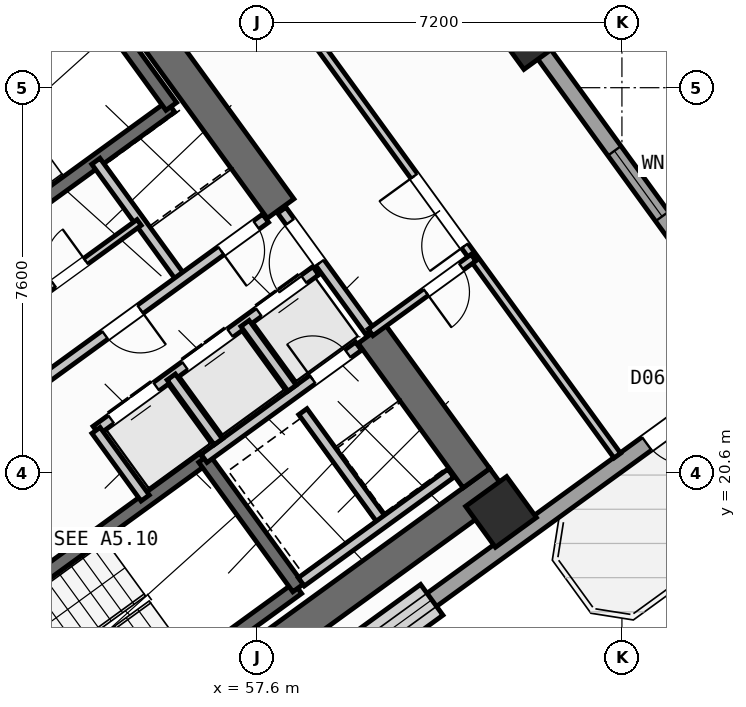
"""IFC4 building model, lengths in metres.
Left out: names, types, materials, properties, quantities, classifications, styles, units other than length and angle.
Written with IfcOpenShell. Run it as: python <this file> out.ifc"""

import sys

from ifc_helpers import new_model, si_unit, direction, frame, frame_2d, origin, origin_2d, place, context, subcontext, project, spatial, rectangle, hollow_rectangle, extrude, source, transform, mapped, element, fill, save


model = new_model("IFC4")
c1 = context("Model", 3, precision=1e-05, world=origin(), true_north=direction((0.0, 1.0)))
c2 = subcontext(c1, "Body", "Model", "MODEL_VIEW")
j1 = project(units=[si_unit("LENGTHUNIT", "METRE"), si_unit("PLANEANGLEUNIT", "RADIAN")], contexts=[c1])
p1 = place(None, origin())
s1 = spatial("IfcSite", under=j1, at=p1, CompositionType="ELEMENT")
p2 = place(p1, origin())
s2 = spatial("IfcBuilding", under=s1, at=p2, CompositionType="ELEMENT")
p3 = place(p2, frame((0.0, 0.0, 76.5)))
s3 = spatial("IfcBuildingStorey", under=s2, at=p3, CompositionType="ELEMENT", Elevation=76.5)
p4 = place(p3, frame((52.318, 13.11, 0.0), z_axis=(0.0, 0.0, 1.0), x_axis=(0.809019445368, 0.587781878776, 0.0)))
e1 = element("IfcWall", 1, at=p4, inside=s3, PredefinedType="SHEAR", context=c2, shape_type="SweptSolid", body=[
    extrude(rectangle(XDim=12.44, YDim=0.65, at=frame_2d((6.22, 0.0))), origin(), (0.0, 0.0, 1.0), 4.25),
])
p5 = place(p3, frame((44.325, 24.113, 0.0), z_axis=(0.0, 0.0, 1.0), x_axis=(0.809012664862, 0.58779121131, 0.0)))
e2 = element("IfcWall", 2, at=p5, inside=s3, PredefinedType="SHEAR", context=c2, shape_type="SweptSolid", body=[
    extrude(rectangle(XDim=12.44, YDim=0.65, at=frame_2d((6.22, 0.0))), origin(), (0.0, 0.0, 1.0), 4.25),
])
p6 = place(p3, frame((61.929, 20.494, 0.0), z_axis=(0.0, 0.0, 1.0), x_axis=(-0.58782982593, 0.808984607855, 0.0)))
e3 = element("IfcWall", 3, at=p6, inside=s3, PredefinedType="SHEAR", context=c2, shape_type="SweptSolid", body=[
    extrude(rectangle(XDim=3.525, YDim=0.65, at=frame_2d((1.762, 0.0))), origin(), (0.0, 0.0, 1.0), 4.25),
])
p7 = place(p3, frame((58.064, 25.813, 0.0), z_axis=(0.0, 0.0, 1.0), x_axis=(-0.58777996584, 0.809020835181, 0.0)))
e4 = element("IfcWall", 4, at=p7, inside=s3, PredefinedType="SHEAR", context=c2, shape_type="SweptSolid", body=[
    extrude(rectangle(XDim=6.375, YDim=0.65, at=frame_2d((3.188, 0.0))), origin(), (0.0, 0.0, 1.0), 4.25),
])
m1 = source(origin(), c2, "Body", "SweptSolid", [
    extrude(hollow_rectangle(XDim=1.0, YDim=1.0, WallThickness=0.04, at=origin_2d()), origin(), (0.0, 0.0, 1.0), 4.5),
])
for number, where, z_axis, x_axis in (
    (5, (62.414, 19.827, 0.0), (0.0, 0.0, 1.0), (0.809, 0.588, 0.0)),
    (6, (62.977, 29.259, 0.0), (0.0, 0.0, 1.0), (0.809, 0.588, 0.0)),
):
    element("IfcColumn", number, at=place(p3, frame(where, z_axis=z_axis, x_axis=x_axis)), inside=s3, PredefinedType="COLUMN", context=c2, shape_type="MappedRepresentation", body=[
        mapped(m1, transform((0.0, 0.0, 0.0), scale=1.0)),
    ])
p8 = place(p3, frame((54.81, 40.5, 0.0), z_axis=(0.0, 0.0, 1.0), x_axis=(0.587783625747, -0.809018176127, 0.0)))
e7 = element("IfcWall", 7, at=p8, inside=s3, PredefinedType="STANDARD", context=c2, shape_type="SweptSolid", body=[
    extrude(rectangle(XDim=21.587, YDim=0.32, at=frame_2d((10.794, 0.0))), origin(), (0.0, 0.0, 1.0), 3.625),
])
p9 = place(p8, frame((2.106, 0.0, 0.7)))
e8 = element("IfcOpeningElement", 8, at=p9, cuts=e7, PredefinedType="OPENING", context=c2, shape_type="SweptSolid", body=[
    extrude(rectangle(XDim=2.6, YDim=2.0, at=frame_2d((1.3, 1.0))), frame((0.0, 0.17, 0.0), z_axis=(0.0, -1.0, 0.0), x_axis=(1.0, 0.0, 0.0)), (0.0, 0.0, 1.0), 0.34),
])
p10 = place(p8, frame((9.244, 0.0, 0.75)))
e9 = element("IfcOpeningElement", 9, at=p10, cuts=e7, PredefinedType="OPENING", context=c2, shape_type="SweptSolid", body=[
    extrude(rectangle(XDim=2.0, YDim=1.95, at=frame_2d((1.0, 0.975))), frame((0.0, 0.17, 0.0), z_axis=(0.0, -1.0, 0.0), x_axis=(1.0, 0.0, 0.0)), (0.0, 0.0, 1.0), 0.34),
])
p11 = place(p8, frame((16.744, 0.0, 0.85)))
e10 = element("IfcOpeningElement", 10, at=p11, cuts=e7, PredefinedType="OPENING", context=c2, shape_type="SweptSolid", body=[
    extrude(rectangle(XDim=1.6, YDim=1.8, at=frame_2d((0.8, 0.9))), frame((0.0, 0.17, 0.0), z_axis=(0.0, -1.0, 0.0), x_axis=(1.0, 0.0, 0.0)), (0.0, 0.0, 1.0), 0.34),
])
p12 = place(p3, frame((67.454, 22.747, 0.0), z_axis=(0.0, 0.0, 1.0), x_axis=(-0.809021120468, -0.587779573171, 0.0)))
e11 = element("IfcWall", 11, at=p12, inside=s3, PredefinedType="STANDARD", context=c2, shape_type="SweptSolid", body=[
    extrude(rectangle(XDim=17.588, YDim=0.32, at=frame_2d((8.794, 0.0))), origin(), (0.0, 0.0, 1.0), 4.25),
])
p13 = place(p12, frame((1.624, 0.0, 0.0)))
e12 = element("IfcOpeningElement", 12, at=p13, cuts=e11, PredefinedType="OPENING", context=c2, shape_type="SweptSolid", body=[
    extrude(rectangle(XDim=1.05, YDim=2.15, at=frame_2d((0.525, 1.075))), frame((0.0, 0.17, 0.0), z_axis=(0.0, -1.0, 0.0), x_axis=(1.0, 0.0, 0.0)), (0.0, 0.0, 1.0), 0.34),
])
p14 = place(p12, frame((7.919, 0.0, 0.7)))
e13 = element("IfcOpeningElement", 13, at=p14, cuts=e11, PredefinedType="OPENING", context=c2, shape_type="SweptSolid", body=[
    extrude(rectangle(XDim=2.6, YDim=2.0, at=frame_2d((1.3, 1.0))), frame((0.0, 0.17, 0.0), z_axis=(0.0, -1.0, 0.0), x_axis=(1.0, 0.0, 0.0)), (0.0, 0.0, 1.0), 0.34),
])
p15 = place(p12, frame((13.069, 0.0, 0.7)))
e14 = element("IfcOpeningElement", 14, at=p15, cuts=e11, PredefinedType="OPENING", context=c2, shape_type="SweptSolid", body=[
    extrude(rectangle(XDim=2.6, YDim=2.0, at=frame_2d((1.3, 1.0))), frame((0.0, 0.17, 0.0), z_axis=(0.0, -1.0, 0.0), x_axis=(1.0, 0.0, 0.0)), (0.0, 0.0, 1.0), 0.34),
])
p16 = place(p3, frame((48.006, 25.996, 0.0), z_axis=(0.0, 0.0, 1.0), x_axis=(0.80901903764, 0.587782439969, 0.0)))
e15 = element("IfcWall", 15, at=p16, inside=s3, PredefinedType="SHEAR", context=c2, shape_type="SweptSolid", body=[
    extrude(rectangle(XDim=7.46, YDim=0.26, at=frame_2d((3.73, 0.0))), origin(), (0.0, 0.0, 1.0), 4.25),
])
p17 = place(p3, frame((49.863, 23.44, 0.0), z_axis=(0.0, 0.0, 1.0), x_axis=(0.809003474932, 0.587803859759, 0.0)))
e16 = element("IfcWall", 16, at=p17, inside=s3, PredefinedType="SHEAR", context=c2, shape_type="SweptSolid", body=[
    extrude(rectangle(XDim=7.46, YDim=0.26, at=frame_2d((3.73, 0.0))), origin(), (0.0, 0.0, 1.0), 4.25),
])
p18 = place(p17, frame((0.36, 0.0, 0.0)))
e17 = element("IfcOpeningElement", 17, at=p18, cuts=e16, PredefinedType="OPENING", context=c2, shape_type="SweptSolid", body=[
    extrude(rectangle(XDim=0.86, YDim=2.05, at=frame_2d((0.43, 1.025))), frame((0.0, 0.14, 0.0), z_axis=(0.0, -1.0, 0.0), x_axis=(1.0, 0.0, 0.0)), (0.0, 0.0, 1.0), 0.28),
])
p19 = place(p3, frame((55.906, 27.831, 0.0), z_axis=(0.0, 0.0, 1.0), x_axis=(-0.587804123638, 0.809003283204, 0.0)))
e18 = element("IfcWall", 18, at=p19, inside=s3, PredefinedType="SHEAR", context=c2, shape_type="SweptSolid", body=[
    extrude(rectangle(XDim=3.16, YDim=0.26, at=frame_2d((1.58, 0.0))), origin(), (0.0, 0.0, 1.0), 4.25),
])
p20 = place(p3, frame((52.472, 14.013, 0.0), z_axis=(0.0, 0.0, 1.0), x_axis=(0.809028366311, 0.587769599847, 0.0)))
e19 = element("IfcWall", 19, at=p20, inside=s3, PredefinedType="SHEAR", context=c2, shape_type="SweptSolid", body=[
    extrude(rectangle(XDim=7.33, YDim=0.26, at=frame_2d((3.665, 0.0))), origin(), (0.0, 0.0, 1.0), 4.25),
])
p21 = place(p3, frame((50.615, 16.57, 0.0), z_axis=(0.0, 0.0, 1.0), x_axis=(0.809028366311, 0.587769599847, 0.0)))
e20 = element("IfcWall", 20, at=p21, inside=s3, PredefinedType="SHEAR", context=c2, shape_type="SweptSolid", body=[
    extrude(rectangle(XDim=7.33, YDim=0.26, at=frame_2d((3.665, 0.0))), origin(), (0.0, 0.0, 1.0), 4.25),
])
p22 = place(p21, frame((0.22, 0.0, 0.0)))
e21 = element("IfcOpeningElement", 21, at=p22, cuts=e20, PredefinedType="OPENING", context=c2, shape_type="SweptSolid", body=[
    extrude(rectangle(XDim=1.1, YDim=2.1, at=frame_2d((0.55, 1.05))), frame((0.0, 0.14, 0.0), z_axis=(0.0, -1.0, 0.0), x_axis=(1.0, 0.0, 0.0)), (0.0, 0.0, 1.0), 0.28),
])
p23 = place(p3, frame((58.41, 18.327, 0.0), z_axis=(0.0, 0.0, 1.0), x_axis=(-0.58776738483, 0.809029975545, 0.0)))
e22 = element("IfcWall", 22, at=p23, inside=s3, PredefinedType="SHEAR", context=c2, shape_type="SweptSolid", body=[
    extrude(rectangle(XDim=3.16, YDim=0.26, at=frame_2d((1.58, 0.0))), origin(), (0.0, 0.0, 1.0), 4.25),
])
p24 = place(p3, frame((56.553, 20.884, 0.0), z_axis=(0.0, 0.0, 1.0), x_axis=(0.809035789462, 0.587759382205, 0.0)))
e23 = element("IfcWall", 23, at=p24, inside=s3, PredefinedType="STANDARD", context=c2, shape_type="SweptSolid", body=[
    extrude(rectangle(XDim=3.768, YDim=0.2, at=frame_2d((1.884, 0.0))), origin(), (0.0, 0.0, 1.0), 4.24),
])
p25 = place(p24, frame((2.65, 0.0, 0.0)))
e24 = element("IfcOpeningElement", 24, at=p25, cuts=e23, PredefinedType="OPENING", context=c2, shape_type="SweptSolid", body=[
    extrude(rectangle(XDim=0.86, YDim=2.05, at=frame_2d((0.43, 1.025))), frame((0.0, 0.11, 0.0), z_axis=(0.0, -1.0, 0.0), x_axis=(1.0, 0.0, 0.0)), (0.0, 0.0, 1.0), 0.22),
])
p26 = place(p3, frame((54.421, 21.436, 0.0), z_axis=(0.0, 0.0, 1.0), x_axis=(0.809013710463, 0.587789772183, 0.0)))
e25 = element("IfcWall", 25, at=p26, inside=s3, PredefinedType="STANDARD", context=c2, shape_type="SweptSolid", body=[
    extrude(rectangle(XDim=5.36, YDim=0.2, at=frame_2d((2.68, 0.0))), origin(), (0.0, 0.0, 1.0), 4.24),
])
p27 = place(p26, frame((0.37, 0.0, 0.0)))
e26 = element("IfcOpeningElement", 26, at=p27, cuts=e25, PredefinedType="OPENING", context=c2, shape_type="SweptSolid", body=[
    extrude(rectangle(XDim=1.1, YDim=2.15, at=frame_2d((0.55, 1.075))), frame((0.0, 0.11, 0.0), z_axis=(0.0, -1.0, 0.0), x_axis=(1.0, 0.0, 0.0)), (0.0, 0.0, 1.0), 0.22),
])
p28 = place(p26, frame((2.17, 0.0, 0.0)))
e27 = element("IfcOpeningElement", 27, at=p28, cuts=e25, PredefinedType="OPENING", context=c2, shape_type="SweptSolid", body=[
    extrude(rectangle(XDim=1.1, YDim=2.15, at=frame_2d((0.55, 1.075))), frame((0.0, 0.11, 0.0), z_axis=(0.0, -1.0, 0.0), x_axis=(1.0, 0.0, 0.0)), (0.0, 0.0, 1.0), 0.22),
])
p29 = place(p26, frame((3.97, 0.0, 0.0)))
e28 = element("IfcOpeningElement", 28, at=p29, cuts=e25, PredefinedType="OPENING", context=c2, shape_type="SweptSolid", body=[
    extrude(rectangle(XDim=1.1, YDim=2.15, at=frame_2d((0.55, 1.075))), frame((0.0, 0.11, 0.0), z_axis=(0.0, -1.0, 0.0), x_axis=(1.0, 0.0, 0.0)), (0.0, 0.0, 1.0), 0.22),
])
p30 = place(p3, frame((55.391, 20.102, 0.0), z_axis=(0.0, 0.0, 1.0), x_axis=(-0.58778447739, 0.809017557374, 0.0)))
e29 = element("IfcWall", 29, at=p30, inside=s3, PredefinedType="STANDARD", context=c2, shape_type="SweptSolid", body=[
    extrude(rectangle(XDim=1.65, YDim=0.2, at=frame_2d((0.825, 0.0))), origin(), (0.0, 0.0, 1.0), 4.24),
])
p31 = place(p3, frame((56.834, 21.212, 0.0), z_axis=(0.0, 0.0, 1.0), x_axis=(-0.58776738483, 0.809029975545, 0.0)))
e30 = element("IfcWall", 30, at=p31, inside=s3, PredefinedType="STANDARD", context=c2, shape_type="SweptSolid", body=[
    extrude(rectangle(XDim=1.58, YDim=0.2, at=frame_2d((0.79, 0.0))), origin(), (0.0, 0.0, 1.0), 4.24),
])
p32 = place(p3, frame((58.29, 22.27, 0.0), z_axis=(0.0, 0.0, 1.0), x_axis=(-0.587840865826, 0.808976585857, 0.0)))
e31 = element("IfcWall", 31, at=p32, inside=s3, PredefinedType="STANDARD", context=c2, shape_type="SweptSolid", body=[
    extrude(rectangle(XDim=1.58, YDim=0.2, at=frame_2d((0.79, 0.0))), origin(), (0.0, 0.0, 1.0), 4.24),
])
p33 = place(p3, frame((60.067, 19.655, 0.0), z_axis=(0.0, 0.0, 1.0), x_axis=(-0.587800520745, 0.809005900975, 0.0)))
e32 = element("IfcWall", 32, at=p33, inside=s3, PredefinedType="STANDARD", context=c2, shape_type="SweptSolid", body=[
    extrude(rectangle(XDim=2.66, YDim=0.2, at=frame_2d((1.33, 0.0))), origin(), (0.0, 0.0, 1.0), 4.24),
])
p34 = place(p3, frame((58.472, 18.447, 0.0), z_axis=(0.0, 0.0, 1.0), x_axis=(0.809022487728, 0.587777691266, 0.0)))
e33 = element("IfcWall", 33, at=p34, inside=s3, PredefinedType="STANDARD", context=c2, shape_type="SweptSolid", body=[
    extrude(rectangle(XDim=3.648, YDim=0.2, at=frame_2d((1.824, 0.0))), origin(), (0.0, 0.0, 1.0), 4.24),
])
p35 = place(p3, frame((56.111, 24.419, 0.0), z_axis=(0.0, 0.0, 1.0), x_axis=(-0.58777848983, 0.809021907548, 0.0)))
e34 = element("IfcWall", 34, at=p35, inside=s3, PredefinedType="STANDARD", context=c2, shape_type="SweptSolid", body=[
    extrude(rectangle(XDim=2.88, YDim=0.2, at=frame_2d((1.44, 0.0))), origin(), (0.0, 0.0, 1.0), 4.24),
])
p36 = place(p3, frame((53.425, 22.468, 0.0), z_axis=(0.0, 0.0, 1.0), x_axis=(0.80902705128, 0.587771409902, 0.0)))
e35 = element("IfcWall", 35, at=p36, inside=s3, PredefinedType="STANDARD", context=c2, shape_type="SweptSolid", body=[
    extrude(rectangle(XDim=5.368, YDim=0.2, at=frame_2d((2.684, 0.0))), origin(), (0.0, 0.0, 1.0), 4.24),
])
p37 = place(p36, frame((4.28, 0.0, 0.0)))
e36 = element("IfcOpeningElement", 36, at=p37, cuts=e35, PredefinedType="OPENING", context=c2, shape_type="SweptSolid", body=[
    extrude(rectangle(XDim=0.86, YDim=2.05, at=frame_2d((0.43, 1.025))), frame((0.0, 0.11, 0.0), z_axis=(0.0, -1.0, 0.0), x_axis=(1.0, 0.0, 0.0)), (0.0, 0.0, 1.0), 0.22),
])
p38 = place(p36, frame((1.45, 0.0, 0.0)))
e37 = element("IfcOpeningElement", 37, at=p38, cuts=e35, PredefinedType="OPENING", context=c2, shape_type="SweptSolid", body=[
    extrude(rectangle(XDim=0.86, YDim=2.05, at=frame_2d((0.43, 1.025))), frame((0.0, 0.11, 0.0), z_axis=(0.0, -1.0, 0.0), x_axis=(1.0, 0.0, 0.0)), (0.0, 0.0, 1.0), 0.22),
])
p39 = place(p3, frame((52.618, 23.612, 0.0), z_axis=(0.0, 0.0, 1.0), x_axis=(0.809009587469, 0.587795446889, 0.0)))
e38 = element("IfcWall", 38, at=p39, inside=s3, PredefinedType="PLUMBINGWALL", context=c2, shape_type="SweptSolid", body=[
    extrude(rectangle(XDim=3.28, YDim=0.14, at=frame_2d((1.64, 0.0))), origin(), (0.0, 0.0, 1.0), 4.24),
])
p40 = place(p39, frame((1.2, 0.0, 0.0)))
e39 = element("IfcOpeningElement", 39, at=p40, cuts=e38, PredefinedType="OPENING", context=c2, shape_type="SweptSolid", body=[
    extrude(rectangle(XDim=0.78, YDim=2.05, at=frame_2d((0.39, 1.025))), frame((0.0, 0.08, 0.0), z_axis=(0.0, -1.0, 0.0), x_axis=(1.0, 0.0, 0.0)), (0.0, 0.0, 1.0), 0.16),
])
p41 = place(p3, frame((59.827, 23.386, 0.0), z_axis=(0.0, 0.0, 1.0), x_axis=(-0.587803840107, 0.809003489211, 0.0)))
e40 = element("IfcWall", 40, at=p41, inside=s3, PredefinedType="STANDARD", context=c2, shape_type="SweptSolid", body=[
    extrude(rectangle(XDim=2.96, YDim=0.2, at=frame_2d((1.48, 0.0))), origin(), (0.0, 0.0, 1.0), 4.24),
])
p42 = place(p41, frame((1.68, 0.0, 0.0)))
e41 = element("IfcOpeningElement", 41, at=p42, cuts=e40, PredefinedType="OPENING", context=c2, shape_type="SweptSolid", body=[
    extrude(rectangle(XDim=1.0, YDim=2.1, at=frame_2d((0.5, 1.05))), frame((0.0, 0.11, 0.0), z_axis=(0.0, -1.0, 0.0), x_axis=(1.0, 0.0, 0.0)), (0.0, 0.0, 1.0), 0.22),
])
p43 = place(p3, frame((64.709, 20.938, 0.0), z_axis=(0.0, 0.0, 1.0), x_axis=(-0.58777828151, 0.809022058899, 0.0)))
e42 = element("IfcWall", 42, at=p43, inside=s3, PredefinedType="PARTITIONING", context=c2, shape_type="SweptSolid", body=[
    extrude(rectangle(XDim=21.7, YDim=0.16, at=frame_2d((10.85, 0.0))), origin(), (0.0, 0.0, 1.0), 4.24),
])
p44 = place(p43, frame((5.12, 0.0, 0.0)))
e43 = element("IfcOpeningElement", 43, at=p44, cuts=e42, PredefinedType="OPENING", context=c2, shape_type="SweptSolid", body=[
    extrude(rectangle(XDim=1.7, YDim=2.2, at=frame_2d((0.85, 1.1))), frame((0.0, 0.09, 0.0), z_axis=(0.0, -1.0, 0.0), x_axis=(1.0, 0.0, 0.0)), (0.0, 0.0, 1.0), 0.18),
])
p45 = place(p3, frame((59.839, 23.37, 0.0), z_axis=(0.0, 0.0, 1.0), x_axis=(0.809000999347, 0.58780726693, 0.0)))
e44 = element("IfcWall", 44, at=p45, inside=s3, PredefinedType="PARTITIONING", context=c2, shape_type="SweptSolid", body=[
    extrude(rectangle(XDim=2.51, YDim=0.16, at=frame_2d((1.255, 0.0))), origin(), (0.0, 0.0, 1.0), 4.24),
])
p46 = place(p45, frame((1.35, 0.0, 0.0)))
e45 = element("IfcOpeningElement", 45, at=p46, cuts=e44, PredefinedType="OPENING", context=c2, shape_type="SweptSolid", body=[
    extrude(rectangle(XDim=0.86, YDim=2.05, at=frame_2d((0.43, 1.025))), frame((0.0, 0.09, 0.0), z_axis=(0.0, -1.0, 0.0), x_axis=(1.0, 0.0, 0.0)), (0.0, 0.0, 1.0), 0.18),
])
p47 = place(p3, frame((42.866, 26.044, 0.0), z_axis=(0.0, 0.0, 1.0), x_axis=(0.809020254154, 0.587780765566, 0.0)))
e46 = element("IfcWall", 46, at=p47, inside=s3, PredefinedType="PARTITIONING", context=c2, shape_type="SweptSolid", body=[
    extrude(rectangle(XDim=14.67, YDim=0.16, at=frame_2d((7.335, 0.0))), origin(), (0.0, 0.0, 1.0), 4.24),
])
p48 = place(p47, frame((1.8, 0.0, 0.0)))
e47 = element("IfcOpeningElement", 47, at=p48, cuts=e46, PredefinedType="OPENING", context=c2, shape_type="SweptSolid", body=[
    extrude(rectangle(XDim=1.0, YDim=2.1, at=frame_2d((0.5, 1.05))), frame((0.0, 0.09, 0.0), z_axis=(0.0, -1.0, 0.0), x_axis=(1.0, 0.0, 0.0)), (0.0, 0.0, 1.0), 0.18),
])
p49 = place(p47, frame((7.6, 0.0, 0.0)))
e48 = element("IfcOpeningElement", 48, at=p49, cuts=e46, PredefinedType="OPENING", context=c2, shape_type="SweptSolid", body=[
    extrude(rectangle(XDim=1.0, YDim=2.1, at=frame_2d((0.5, 1.05))), frame((0.0, 0.09, 0.0), z_axis=(0.0, -1.0, 0.0), x_axis=(1.0, 0.0, 0.0)), (0.0, 0.0, 1.0), 0.18),
])
m2 = source(origin(), c2, "Body", "SweptSolid", [
    extrude(rectangle(XDim=1.05, YDim=2.15, at=frame_2d((0.525, 1.075))), frame((0.0, 0.025, 0.0), z_axis=(0.0, -1.0, 0.0), x_axis=(1.0, 0.0, 0.0)), (0.0, 0.0, 1.0), 0.05),
])
p50 = place(p13, origin())
e49 = element("IfcDoor", 49, at=p50, inside=s3, OperationType="SINGLE_SWING_LEFT", PredefinedType="DOOR", context=c2, shape_type="MappedRepresentation", body=[
    mapped(m2, transform((0.0, 0.0, 0.0), scale=1.0)),
])
fill(e12, e49)
m3 = source(origin(), c2, "Body", "SweptSolid", [
    extrude(rectangle(XDim=1.6, YDim=1.8, at=frame_2d((0.8, 0.9))), frame((0.0, 0.03, 0.0), z_axis=(0.0, -1.0, 0.0), x_axis=(1.0, 0.0, 0.0)), (0.0, 0.0, 1.0), 0.06),
])
p51 = place(p11, origin())
e50 = element("IfcWindow", 50, at=p51, inside=s3, PartitioningType="SINGLE_PANEL", PredefinedType="WINDOW", context=c2, shape_type="MappedRepresentation", body=[
    mapped(m3, transform((0.0, 0.0, 0.0), scale=1.0)),
])
fill(e10, e50)
m4 = source(origin(), c2, "Body", "SweptSolid", [
    extrude(rectangle(XDim=2.6, YDim=2.0, at=frame_2d((1.3, 1.0))), frame((0.0, 0.03, 0.0), z_axis=(0.0, -1.0, 0.0), x_axis=(1.0, 0.0, 0.0)), (0.0, 0.0, 1.0), 0.06),
])
p52 = place(p14, origin())
e51 = element("IfcWindow", 51, at=p52, inside=s3, PartitioningType="SINGLE_PANEL", PredefinedType="WINDOW", context=c2, shape_type="MappedRepresentation", body=[
    mapped(m4, transform((0.0, 0.0, 0.0), scale=1.0)),
])
fill(e13, e51)
m5 = source(origin(), c2, "Body", "SweptSolid", [
    extrude(rectangle(XDim=1.1, YDim=2.15, at=frame_2d((0.55, 1.075))), frame((0.0, 0.025, 0.0), z_axis=(0.0, -1.0, 0.0), x_axis=(1.0, 0.0, 0.0)), (0.0, 0.0, 1.0), 0.05),
])
p53 = place(p27, origin())
e52 = element("IfcDoor", 52, at=p53, inside=s3, OperationType="DOUBLE_DOOR_SLIDING", PredefinedType="DOOR", context=c2, shape_type="MappedRepresentation", body=[
    mapped(m5, transform((0.0, 0.0, 0.0), scale=1.0)),
])
fill(e26, e52)
p54 = place(p28, origin())
e53 = element("IfcDoor", 53, at=p54, inside=s3, OperationType="DOUBLE_DOOR_SLIDING", PredefinedType="DOOR", context=c2, shape_type="MappedRepresentation", body=[
    mapped(m5, transform((0.0, 0.0, 0.0), scale=1.0)),
])
fill(e27, e53)
p55 = place(p29, origin())
e54 = element("IfcDoor", 54, at=p55, inside=s3, OperationType="DOUBLE_DOOR_SLIDING", PredefinedType="DOOR", context=c2, shape_type="MappedRepresentation", body=[
    mapped(m5, transform((0.0, 0.0, 0.0), scale=1.0)),
])
fill(e28, e54)
m6 = source(origin(), c2, "Body", "SweptSolid", [
    extrude(rectangle(XDim=0.86, YDim=2.05, at=frame_2d((0.43, 1.025))), frame((0.0, 0.025, 0.0), z_axis=(0.0, -1.0, 0.0), x_axis=(1.0, 0.0, 0.0)), (0.0, 0.0, 1.0), 0.05),
])
p56 = place(p25, origin())
e55 = element("IfcDoor", 55, at=p56, inside=s3, OperationType="SINGLE_SWING_LEFT", PredefinedType="DOOR", context=c2, shape_type="MappedRepresentation", body=[
    mapped(m6, transform((0.0, 0.0, 0.0), scale=1.0)),
])
fill(e24, e55)
p57 = place(p37, frame((0.86, 0.0, 0.0), z_axis=(0.0, 0.0, 1.0), x_axis=(-1.0, 0.0, 0.0)))
e56 = element("IfcDoor", 56, at=p57, inside=s3, OperationType="SINGLE_SWING_RIGHT", PredefinedType="DOOR", context=c2, shape_type="MappedRepresentation", body=[
    mapped(m6, transform((0.0, 0.0, 0.0), scale=1.0)),
])
fill(e36, e56)
p58 = place(p38, frame((0.86, 0.0, 0.0), z_axis=(0.0, 0.0, 1.0), x_axis=(-1.0, 0.0, 0.0)))
e57 = element("IfcDoor", 57, at=p58, inside=s3, OperationType="SINGLE_SWING_LEFT", PredefinedType="DOOR", context=c2, shape_type="MappedRepresentation", body=[
    mapped(m6, transform((0.0, 0.0, 0.0), scale=1.0)),
])
fill(e37, e57)
m7 = source(origin(), c2, "Body", "SweptSolid", [
    extrude(rectangle(XDim=0.78, YDim=2.05, at=frame_2d((0.39, 1.025))), frame((0.0, 0.025, 0.0), z_axis=(0.0, -1.0, 0.0), x_axis=(1.0, 0.0, 0.0)), (0.0, 0.0, 1.0), 0.05),
])
p59 = place(p40, origin())
e58 = element("IfcDoor", 58, at=p59, inside=s3, OperationType="SINGLE_SWING_RIGHT", PredefinedType="DOOR", context=c2, shape_type="MappedRepresentation", body=[
    mapped(m7, transform((0.0, 0.0, 0.0), scale=1.0)),
])
fill(e39, e58)
p60 = place(p46, frame((0.86, 0.0, 0.0), z_axis=(0.0, 0.0, 1.0), x_axis=(-1.0, 0.0, 0.0)))
e59 = element("IfcDoor", 59, at=p60, inside=s3, OperationType="SINGLE_SWING_RIGHT", PredefinedType="DOOR", context=c2, shape_type="MappedRepresentation", body=[
    mapped(m6, transform((0.0, 0.0, 0.0), scale=1.0)),
])
fill(e45, e59)
m8 = source(origin(), c2, "Body", "SweptSolid", [
    extrude(rectangle(XDim=1.0, YDim=2.1, at=frame_2d((0.5, 1.05))), frame((0.0, 0.025, 0.0), z_axis=(0.0, -1.0, 0.0), x_axis=(1.0, 0.0, 0.0)), (0.0, 0.0, 1.0), 0.05),
])
p61 = place(p42, origin())
e60 = element("IfcDoor", 60, at=p61, inside=s3, OperationType="SINGLE_SWING_LEFT", PredefinedType="DOOR", context=c2, shape_type="MappedRepresentation", body=[
    mapped(m8, transform((0.0, 0.0, 0.0), scale=1.0)),
])
fill(e41, e60)
m9 = source(origin(), c2, "Body", "SweptSolid", [
    extrude(rectangle(XDim=1.7, YDim=2.2, at=frame_2d((0.85, 1.1))), frame((0.0, 0.025, 0.0), z_axis=(0.0, -1.0, 0.0), x_axis=(1.0, 0.0, 0.0)), (0.0, 0.0, 1.0), 0.05),
])
p62 = place(p44, origin())
e61 = element("IfcDoor", 61, at=p62, inside=s3, OperationType="DOUBLE_DOOR_SINGLE_SWING", PredefinedType="DOOR", context=c2, shape_type="MappedRepresentation", body=[
    mapped(m9, transform((0.0, 0.0, 0.0), scale=1.0)),
])
fill(e43, e61)
save(model, sys.argv[1])
